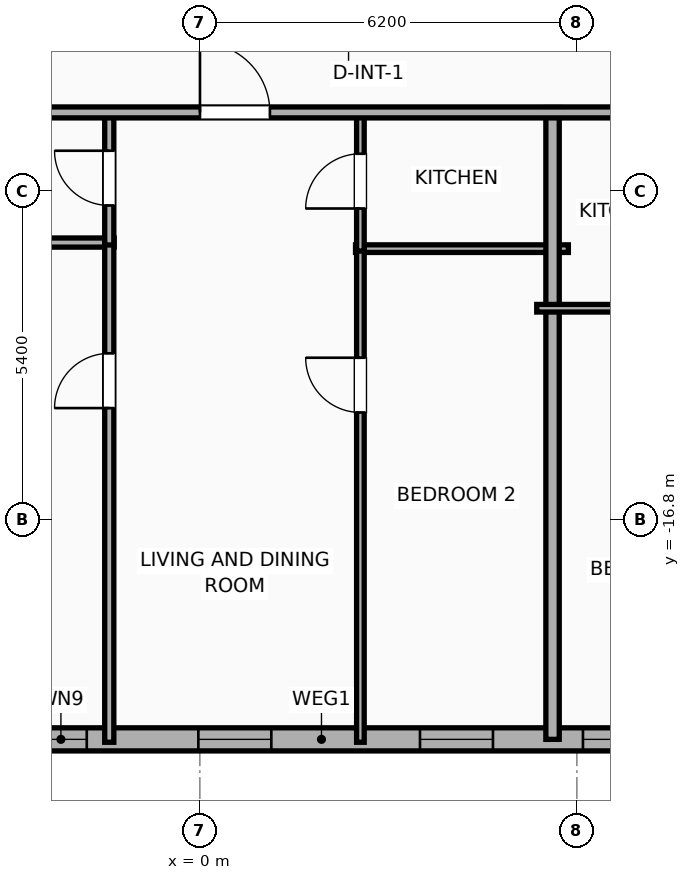
"""IFC4 building model, lengths in metres.
Left out: names, types, materials, properties, quantities, classifications, styles, units other than length and angle.
Written with IfcOpenShell. Run it as: python <this file> out.ifc"""

import sys

from ifc_helpers import new_model, si_unit, direction, frame, frame_2d, origin, place, context, subcontext, project, spatial, rectangle, extrude, element, fill, save


model = new_model("IFC4")
c1 = context("Model", 3, precision=1e-05, world=origin(), true_north=direction((0.0, 1.0)))
c2 = subcontext(c1, "Body", "Model", "MODEL_VIEW")
j1 = project(units=[si_unit("LENGTHUNIT", "METRE"), si_unit("PLANEANGLEUNIT", "RADIAN")], contexts=[c1])
p1 = place(None, origin())
s1 = spatial("IfcSite", under=j1, at=p1, CompositionType="ELEMENT")
p2 = place(p1, origin())
s2 = spatial("IfcBuilding", under=s1, at=p2, CompositionType="ELEMENT")
p3 = place(p2, frame((0.0, 0.0, 101.4)))
s3 = spatial("IfcBuildingStorey", under=s2, at=p3, CompositionType="ELEMENT", Elevation=101.4)
p4 = place(p3, frame((29.381, -20.41, 0.0), z_axis=(0.0, 0.0, 1.0), x_axis=(-1.0, 0.0, 0.0)))
e1 = element("IfcWall", 1, at=p4, inside=s3, PredefinedType="ELEMENTEDWALL", context=c2, shape_type="SweptSolid", body=[
    extrude(rectangle(XDim=54.763, YDim=0.38, at=frame_2d((27.381, 0.0))), origin(), (0.0, 0.0, 1.0), 3.65),
])
p5 = place(p4, frame((6.495, 0.0, 0.75)))
e2 = element("IfcOpeningElement", 2, at=p5, cuts=e1, PredefinedType="OPENING", context=c2, shape_type="SweptSolid", body=[
    extrude(rectangle(XDim=2.4, YDim=2.1, at=frame_2d((1.2, 1.05))), frame((0.0, 0.2, 0.0), z_axis=(0.0, -1.0, 0.0), x_axis=(1.0, 0.0, 0.0)), (0.0, 0.0, 1.0), 0.4),
])
p6 = place(p4, frame((17.686, 0.0, 0.75)))
e3 = element("IfcOpeningElement", 3, at=p6, cuts=e1, PredefinedType="OPENING", context=c2, shape_type="SweptSolid", body=[
    extrude(rectangle(XDim=2.4, YDim=2.1, at=frame_2d((1.2, 1.05))), frame((0.0, 0.2, 0.0), z_axis=(0.0, -1.0, 0.0), x_axis=(1.0, 0.0, 0.0)), (0.0, 0.0, 1.0), 0.4),
])
p7 = place(p4, frame((34.677, 0.0, 0.75)))
e4 = element("IfcOpeningElement", 4, at=p7, cuts=e1, PredefinedType="OPENING", context=c2, shape_type="SweptSolid", body=[
    extrude(rectangle(XDim=2.4, YDim=2.1, at=frame_2d((1.2, 1.05))), frame((0.0, 0.2, 0.0), z_axis=(0.0, -1.0, 0.0), x_axis=(1.0, 0.0, 0.0)), (0.0, 0.0, 1.0), 0.4),
])
p8 = place(p4, frame((45.867, 0.0, 0.75)))
e5 = element("IfcOpeningElement", 5, at=p8, cuts=e1, PredefinedType="OPENING", context=c2, shape_type="SweptSolid", body=[
    extrude(rectangle(XDim=2.4, YDim=2.1, at=frame_2d((1.2, 1.05))), frame((0.0, 0.2, 0.0), z_axis=(0.0, -1.0, 0.0), x_axis=(1.0, 0.0, 0.0)), (0.0, 0.0, 1.0), 0.4),
])
p9 = place(p4, frame((52.281, 0.0, 0.75)))
e6 = element("IfcOpeningElement", 6, at=p9, cuts=e1, PredefinedType="OPENING", context=c2, shape_type="SweptSolid", body=[
    extrude(rectangle(XDim=1.2, YDim=2.05, at=frame_2d((0.6, 1.025))), frame((0.0, 0.2, 0.0), z_axis=(0.0, -1.0, 0.0), x_axis=(1.0, 0.0, 0.0)), (0.0, 0.0, 1.0), 0.4),
])
p10 = place(p4, frame((49.641, 0.0, 0.75)))
e7 = element("IfcOpeningElement", 7, at=p10, cuts=e1, PredefinedType="OPENING", context=c2, shape_type="SweptSolid", body=[
    extrude(rectangle(XDim=1.2, YDim=2.05, at=frame_2d((0.6, 1.025))), frame((0.0, 0.2, 0.0), z_axis=(0.0, -1.0, 0.0), x_axis=(1.0, 0.0, 0.0)), (0.0, 0.0, 1.0), 0.4),
])
p11 = place(p4, frame((39.543, 0.0, 0.75)))
e8 = element("IfcOpeningElement", 8, at=p11, cuts=e1, PredefinedType="OPENING", context=c2, shape_type="SweptSolid", body=[
    extrude(rectangle(XDim=1.2, YDim=2.05, at=frame_2d((0.6, 1.025))), frame((0.0, 0.2, 0.0), z_axis=(0.0, -1.0, 0.0), x_axis=(1.0, 0.0, 0.0)), (0.0, 0.0, 1.0), 0.4),
])
p12 = place(p4, frame((44.538, 0.0, 0.75)))
e9 = element("IfcOpeningElement", 9, at=p12, cuts=e1, PredefinedType="OPENING", context=c2, shape_type="SweptSolid", body=[
    extrude(rectangle(XDim=0.52, YDim=2.05, at=frame_2d((0.26, 1.025))), frame((0.0, 0.2, 0.0), z_axis=(0.0, -1.0, 0.0), x_axis=(1.0, 0.0, 0.0)), (0.0, 0.0, 1.0), 0.4),
])
p13 = place(p4, frame((28.206, 0.0, 0.75)))
e10 = element("IfcOpeningElement", 10, at=p13, cuts=e1, PredefinedType="OPENING", context=c2, shape_type="SweptSolid", body=[
    extrude(rectangle(XDim=1.2, YDim=2.05, at=frame_2d((0.6, 1.025))), frame((0.0, 0.2, 0.0), z_axis=(0.0, -1.0, 0.0), x_axis=(1.0, 0.0, 0.0)), (0.0, 0.0, 1.0), 0.4),
])
p14 = place(p4, frame((31.241, 0.0, 0.75)))
e11 = element("IfcOpeningElement", 11, at=p14, cuts=e1, PredefinedType="OPENING", context=c2, shape_type="SweptSolid", body=[
    extrude(rectangle(XDim=0.85, YDim=2.05, at=frame_2d((0.425, 1.025))), frame((0.0, 0.2, 0.0), z_axis=(0.0, -1.0, 0.0), x_axis=(1.0, 0.0, 0.0)), (0.0, 0.0, 1.0), 0.4),
])
p15 = place(p4, frame((24.561, 0.0, 0.75)))
e12 = element("IfcOpeningElement", 12, at=p15, cuts=e1, PredefinedType="OPENING", context=c2, shape_type="SweptSolid", body=[
    extrude(rectangle(XDim=1.2, YDim=2.05, at=frame_2d((0.6, 1.025))), frame((0.0, 0.2, 0.0), z_axis=(0.0, -1.0, 0.0), x_axis=(1.0, 0.0, 0.0)), (0.0, 0.0, 1.0), 0.4),
])
p16 = place(p4, frame((22.561, 0.0, 0.75)))
e13 = element("IfcOpeningElement", 13, at=p16, cuts=e1, PredefinedType="OPENING", context=c2, shape_type="SweptSolid", body=[
    extrude(rectangle(XDim=0.52, YDim=2.05, at=frame_2d((0.26, 1.025))), frame((0.0, 0.2, 0.0), z_axis=(0.0, -1.0, 0.0), x_axis=(1.0, 0.0, 0.0)), (0.0, 0.0, 1.0), 0.4),
])
p17 = place(p4, frame((13.886, 0.0, 0.75)))
e14 = element("IfcOpeningElement", 14, at=p17, cuts=e1, PredefinedType="OPENING", context=c2, shape_type="SweptSolid", body=[
    extrude(rectangle(XDim=1.2, YDim=2.05, at=frame_2d((0.6, 1.025))), frame((0.0, 0.2, 0.0), z_axis=(0.0, -1.0, 0.0), x_axis=(1.0, 0.0, 0.0)), (0.0, 0.0, 1.0), 0.4),
])
p18 = place(p4, frame((11.694, 0.0, 0.75)))
e15 = element("IfcOpeningElement", 15, at=p18, cuts=e1, PredefinedType="OPENING", context=c2, shape_type="SweptSolid", body=[
    extrude(rectangle(XDim=0.85, YDim=2.05, at=frame_2d((0.425, 1.025))), frame((0.0, 0.2, 0.0), z_axis=(0.0, -1.0, 0.0), x_axis=(1.0, 0.0, 0.0)), (0.0, 0.0, 1.0), 0.4),
])
p19 = place(p4, frame((3.286, 0.0, 0.75)))
e16 = element("IfcOpeningElement", 16, at=p19, cuts=e1, PredefinedType="OPENING", context=c2, shape_type="SweptSolid", body=[
    extrude(rectangle(XDim=1.2, YDim=2.05, at=frame_2d((0.6, 1.025))), frame((0.0, 0.2, 0.0), z_axis=(0.0, -1.0, 0.0), x_axis=(1.0, 0.0, 0.0)), (0.0, 0.0, 1.0), 0.4),
])
p20 = place(p4, frame((0.816, 0.0, 0.75)))
e17 = element("IfcOpeningElement", 17, at=p20, cuts=e1, PredefinedType="OPENING", context=c2, shape_type="SweptSolid", body=[
    extrude(rectangle(XDim=1.2, YDim=2.05, at=frame_2d((0.6, 1.025))), frame((0.0, 0.2, 0.0), z_axis=(0.0, -1.0, 0.0), x_axis=(1.0, 0.0, 0.0)), (0.0, 0.0, 1.0), 0.4),
])
p21 = place(p3, frame((-5.26, -12.24, 0.0), z_axis=(0.0, 0.0, 1.0), x_axis=(1.0, 0.0, 0.0)))
e18 = element("IfcWall", 18, at=p21, inside=s3, PredefinedType="PLUMBINGWALL", context=c2, shape_type="SweptSolid", body=[
    extrude(rectangle(XDim=3.85, YDim=0.15, at=frame_2d((1.925, 0.0))), origin(), (0.0, 0.0, 1.0), 3.65),
])
p22 = place(p3, frame((2.56, -12.34, 0.0), z_axis=(0.0, 0.0, 1.0), x_axis=(1.0, 0.0, 0.0)))
e19 = element("IfcWall", 19, at=p22, inside=s3, PredefinedType="PARTITIONING", context=c2, shape_type="SweptSolid", body=[
    extrude(rectangle(XDim=3.5, YDim=0.125, at=frame_2d((1.75, 0.0))), origin(), (0.0, 0.0, 1.0), 3.65),
])
p23 = place(p3, frame((-1.49, -20.458, 0.0), z_axis=(0.0, 0.0, 1.0), x_axis=(0.0, 1.0, 0.0)))
e20 = element("IfcWall", 20, at=p23, inside=s3, PredefinedType="PLUMBINGWALL", context=c2, shape_type="SweptSolid", body=[
    extrude(rectangle(XDim=8.258, YDim=0.15, at=frame_2d((4.129, 0.0))), origin(), (0.0, 0.0, 1.0), 3.65),
])
p24 = place(p23, frame((5.496, 0.0, 0.0)))
e21 = element("IfcOpeningElement", 21, at=p24, cuts=e20, PredefinedType="OPENING", context=c2, shape_type="SweptSolid", body=[
    extrude(rectangle(XDim=0.9, YDim=2.05, at=frame_2d((0.45, 1.025))), frame((0.0, 0.085, 0.0), z_axis=(0.0, -1.0, 0.0), x_axis=(1.0, 0.0, 0.0)), (0.0, 0.0, 1.0), 0.17),
])
p25 = place(p3, frame((-1.49, -12.28, 0.0), z_axis=(0.0, 0.0, 1.0), x_axis=(0.0, 1.0, 0.0)))
e22 = element("IfcWall", 22, at=p25, inside=s3, PredefinedType="PLUMBINGWALL", context=c2, shape_type="SweptSolid", body=[
    extrude(rectangle(XDim=2.2, YDim=0.15, at=frame_2d((1.1, 0.0))), origin(), (0.0, 0.0, 1.0), 3.65),
])
p26 = place(p25, frame((0.65, 0.0, 0.0)))
e23 = element("IfcOpeningElement", 23, at=p26, cuts=e22, PredefinedType="OPENING", context=c2, shape_type="SweptSolid", body=[
    extrude(rectangle(XDim=0.9, YDim=2.05, at=frame_2d((0.45, 1.025))), frame((0.0, 0.085, 0.0), z_axis=(0.0, -1.0, 0.0), x_axis=(1.0, 0.0, 0.0)), (0.0, 0.0, 1.0), 0.17),
])
p27 = place(p3, frame((2.64, -20.458, 0.0), z_axis=(0.0, 0.0, 1.0), x_axis=(0.0, 1.0, 0.0)))
e24 = element("IfcWall", 24, at=p27, inside=s3, PredefinedType="PARTITIONING", context=c2, shape_type="SweptSolid", body=[
    extrude(rectangle(XDim=8.157, YDim=0.125, at=frame_2d((4.079, 0.0))), origin(), (0.0, 0.0, 1.0), 3.65),
])
p28 = place(p27, frame((5.424, 0.0, 0.0)))
e25 = element("IfcOpeningElement", 25, at=p28, cuts=e24, PredefinedType="OPENING", context=c2, shape_type="SweptSolid", body=[
    extrude(rectangle(XDim=0.9, YDim=2.05, at=frame_2d((0.45, 1.025))), frame((0.0, 0.073, 0.0), z_axis=(0.0, -1.0, 0.0), x_axis=(1.0, 0.0, 0.0)), (0.0, 0.0, 1.0), 0.145),
])
p29 = place(p3, frame((2.64, -12.38, 0.0), z_axis=(0.0, 0.0, 1.0), x_axis=(0.0, 1.0, 0.0)))
e26 = element("IfcWall", 26, at=p29, inside=s3, PredefinedType="PARTITIONING", context=c2, shape_type="SweptSolid", body=[
    extrude(rectangle(XDim=2.3, YDim=0.125, at=frame_2d((1.15, 0.0))), origin(), (0.0, 0.0, 1.0), 3.65),
])
p30 = place(p29, frame((0.7, 0.0, 0.0)))
e27 = element("IfcOpeningElement", 27, at=p30, cuts=e26, PredefinedType="OPENING", context=c2, shape_type="SweptSolid", body=[
    extrude(rectangle(XDim=0.9, YDim=2.05, at=frame_2d((0.45, 1.025))), frame((0.0, 0.073, 0.0), z_axis=(0.0, -1.0, 0.0), x_axis=(1.0, 0.0, 0.0)), (0.0, 0.0, 1.0), 0.145),
])
p31 = place(p3, frame((5.8, -20.41, 0.0), z_axis=(0.0, 0.0, 1.0), x_axis=(0.0, 1.0, 0.0)))
e28 = element("IfcWall", 28, at=p31, inside=s3, PredefinedType="PARTITIONING", context=c2, shape_type="SweptSolid", body=[
    extrude(rectangle(XDim=10.39, YDim=0.22, at=frame_2d((5.195, 0.0))), origin(), (0.0, 0.0, 1.0), 3.04),
])
p32 = place(p3, frame((5.54, -13.32, 0.0), z_axis=(0.0, 0.0, 1.0), x_axis=(1.0, 0.0, 0.0)))
e29 = element("IfcWall", 29, at=p32, inside=s3, PredefinedType="PARTITIONING", context=c2, shape_type="SweptSolid", body=[
    extrude(rectangle(XDim=3.58, YDim=0.125, at=frame_2d((1.79, 0.0))), origin(), (0.0, 0.0, 1.0), 3.65),
])
p33 = place(p3, frame((-29.21, -10.1, 0.0), z_axis=(0.0, 0.0, 1.0), x_axis=(1.0, 0.0, 0.0)))
e30 = element("IfcWall", 30, at=p33, inside=s3, PredefinedType="PARTITIONING", context=c2, shape_type="SweptSolid", body=[
    extrude(rectangle(XDim=62.42, YDim=0.18, at=frame_2d((31.21, 0.0))), origin(), (0.0, 0.0, 1.0), 3.65),
])
p34 = place(p33, frame((3.033, 0.0, 0.0)))
e31 = element("IfcOpeningElement", 31, at=p34, cuts=e30, PredefinedType="OPENING", context=c2, shape_type="SweptSolid", body=[
    extrude(rectangle(XDim=0.9, YDim=2.05, at=frame_2d((0.45, 1.025))), frame((0.0, 0.1, 0.0), z_axis=(0.0, -1.0, 0.0), x_axis=(1.0, 0.0, 0.0)), (0.0, 0.0, 1.0), 0.2),
])
p35 = place(p33, frame((9.768, 0.0, 0.0)))
e32 = element("IfcOpeningElement", 32, at=p35, cuts=e30, PredefinedType="OPENING", context=c2, shape_type="SweptSolid", body=[
    extrude(rectangle(XDim=0.9, YDim=2.05, at=frame_2d((0.45, 1.025))), frame((0.0, 0.1, 0.0), z_axis=(0.0, -1.0, 0.0), x_axis=(1.0, 0.0, 0.0)), (0.0, 0.0, 1.0), 0.2),
])
p36 = place(p33, frame((18.65, 0.0, 0.0)))
e33 = element("IfcOpeningElement", 33, at=p36, cuts=e30, PredefinedType="OPENING", context=c2, shape_type="SweptSolid", body=[
    extrude(rectangle(XDim=1.15, YDim=2.05, at=frame_2d((0.575, 1.025))), frame((0.0, 0.1, 0.0), z_axis=(0.0, -1.0, 0.0), x_axis=(1.0, 0.0, 0.0)), (0.0, 0.0, 1.0), 0.2),
])
p37 = place(p33, frame((29.212, 0.0, 0.0)))
e34 = element("IfcOpeningElement", 34, at=p37, cuts=e30, PredefinedType="OPENING", context=c2, shape_type="SweptSolid", body=[
    extrude(rectangle(XDim=1.15, YDim=2.05, at=frame_2d((0.575, 1.025))), frame((0.0, 0.1, 0.0), z_axis=(0.0, -1.0, 0.0), x_axis=(1.0, 0.0, 0.0)), (0.0, 0.0, 1.0), 0.2),
])
p38 = place(p33, frame((40.379, 0.0, 0.0)))
e35 = element("IfcOpeningElement", 35, at=p38, cuts=e30, PredefinedType="OPENING", context=c2, shape_type="SweptSolid", body=[
    extrude(rectangle(XDim=1.15, YDim=2.05, at=frame_2d((0.575, 1.025))), frame((0.0, 0.1, 0.0), z_axis=(0.0, -1.0, 0.0), x_axis=(1.0, 0.0, 0.0)), (0.0, 0.0, 1.0), 0.2),
])
p39 = place(p33, frame((50.959, 0.0, 0.0)))
e36 = element("IfcOpeningElement", 36, at=p39, cuts=e30, PredefinedType="OPENING", context=c2, shape_type="SweptSolid", body=[
    extrude(rectangle(XDim=1.15, YDim=2.05, at=frame_2d((0.575, 1.025))), frame((0.0, 0.1, 0.0), z_axis=(0.0, -1.0, 0.0), x_axis=(1.0, 0.0, 0.0)), (0.0, 0.0, 1.0), 0.2),
])
p40 = place(p33, frame((59.117, 0.0, 0.0)))
e37 = element("IfcOpeningElement", 37, at=p40, cuts=e30, PredefinedType="OPENING", context=c2, shape_type="SweptSolid", body=[
    extrude(rectangle(XDim=0.9, YDim=2.05, at=frame_2d((0.45, 1.025))), frame((0.0, 0.1, 0.0), z_axis=(0.0, -1.0, 0.0), x_axis=(1.0, 0.0, 0.0)), (0.0, 0.0, 1.0), 0.2),
])
p41 = place(p13, origin())
e38 = element("IfcWindow", 38, at=p41, inside=s3, PartitioningType="SINGLE_PANEL", PredefinedType="WINDOW", context=c2, shape_type="SweptSolid", body=[
    extrude(rectangle(XDim=1.2, YDim=2.05, at=frame_2d((0.6, 1.025))), frame((0.0, 0.03, 0.0), z_axis=(0.0, -1.0, 0.0), x_axis=(1.0, 0.0, 0.0)), (0.0, 0.0, 1.0), 0.06),
])
fill(e10, e38)
p42 = place(p14, origin())
e39 = element("IfcWindow", 39, at=p42, inside=s3, PartitioningType="SINGLE_PANEL", PredefinedType="WINDOW", context=c2, shape_type="SweptSolid", body=[
    extrude(rectangle(XDim=0.85, YDim=2.05, at=frame_2d((0.425, 1.025))), frame((0.0, 0.03, 0.0), z_axis=(0.0, -1.0, 0.0), x_axis=(1.0, 0.0, 0.0)), (0.0, 0.0, 1.0), 0.06),
])
fill(e11, e39)
p43 = place(p15, origin())
e40 = element("IfcWindow", 40, at=p43, inside=s3, PartitioningType="SINGLE_PANEL", PredefinedType="WINDOW", context=c2, shape_type="SweptSolid", body=[
    extrude(rectangle(XDim=1.2, YDim=2.05, at=frame_2d((0.6, 1.025))), frame((0.0, 0.03, 0.0), z_axis=(0.0, -1.0, 0.0), x_axis=(1.0, 0.0, 0.0)), (0.0, 0.0, 1.0), 0.06),
])
fill(e12, e40)
p44 = place(p16, origin())
e41 = element("IfcWindow", 41, at=p44, inside=s3, PartitioningType="SINGLE_PANEL", PredefinedType="WINDOW", context=c2, shape_type="SweptSolid", body=[
    extrude(rectangle(XDim=0.52, YDim=2.05, at=frame_2d((0.26, 1.025))), frame((0.0, 0.03, 0.0), z_axis=(0.0, -1.0, 0.0), x_axis=(1.0, 0.0, 0.0)), (0.0, 0.0, 1.0), 0.06),
])
fill(e13, e41)
p45 = place(p24, origin())
e42 = element("IfcDoor", 42, at=p45, inside=s3, OperationType="SINGLE_SWING_LEFT", PredefinedType="DOOR", context=c2, shape_type="SweptSolid", body=[
    extrude(rectangle(XDim=0.9, YDim=2.05, at=frame_2d((0.45, 1.025))), frame((0.0, 0.025, 0.0), z_axis=(0.0, -1.0, 0.0), x_axis=(1.0, 0.0, 0.0)), (0.0, 0.0, 1.0), 0.05),
])
fill(e21, e42)
p46 = place(p26, origin())
e43 = element("IfcDoor", 43, at=p46, inside=s3, OperationType="SINGLE_SWING_RIGHT", PredefinedType="DOOR", context=c2, shape_type="SweptSolid", body=[
    extrude(rectangle(XDim=0.9, YDim=2.05, at=frame_2d((0.45, 1.025))), frame((0.0, 0.025, 0.0), z_axis=(0.0, -1.0, 0.0), x_axis=(1.0, 0.0, 0.0)), (0.0, 0.0, 1.0), 0.05),
])
fill(e23, e43)
p47 = place(p28, origin())
e44 = element("IfcDoor", 44, at=p47, inside=s3, OperationType="SINGLE_SWING_RIGHT", PredefinedType="DOOR", context=c2, shape_type="SweptSolid", body=[
    extrude(rectangle(XDim=0.9, YDim=2.05, at=frame_2d((0.45, 1.025))), frame((0.0, 0.025, 0.0), z_axis=(0.0, -1.0, 0.0), x_axis=(1.0, 0.0, 0.0)), (0.0, 0.0, 1.0), 0.05),
])
fill(e25, e44)
p48 = place(p30, origin())
e45 = element("IfcDoor", 45, at=p48, inside=s3, OperationType="SINGLE_SWING_LEFT", PredefinedType="DOOR", context=c2, shape_type="SweptSolid", body=[
    extrude(rectangle(XDim=0.9, YDim=2.05, at=frame_2d((0.45, 1.025))), frame((0.0, 0.025, 0.0), z_axis=(0.0, -1.0, 0.0), x_axis=(1.0, 0.0, 0.0)), (0.0, 0.0, 1.0), 0.05),
])
fill(e27, e45)
p49 = place(p37, origin())
e46 = element("IfcDoor", 46, at=p49, inside=s3, OperationType="SINGLE_SWING_LEFT", PredefinedType="DOOR", context=c2, shape_type="SweptSolid", body=[
    extrude(rectangle(XDim=1.15, YDim=2.05, at=frame_2d((0.575, 1.025))), frame((0.0, 0.025, 0.0), z_axis=(0.0, -1.0, 0.0), x_axis=(1.0, 0.0, 0.0)), (0.0, 0.0, 1.0), 0.05),
])
fill(e34, e46)
save(model, sys.argv[1])
